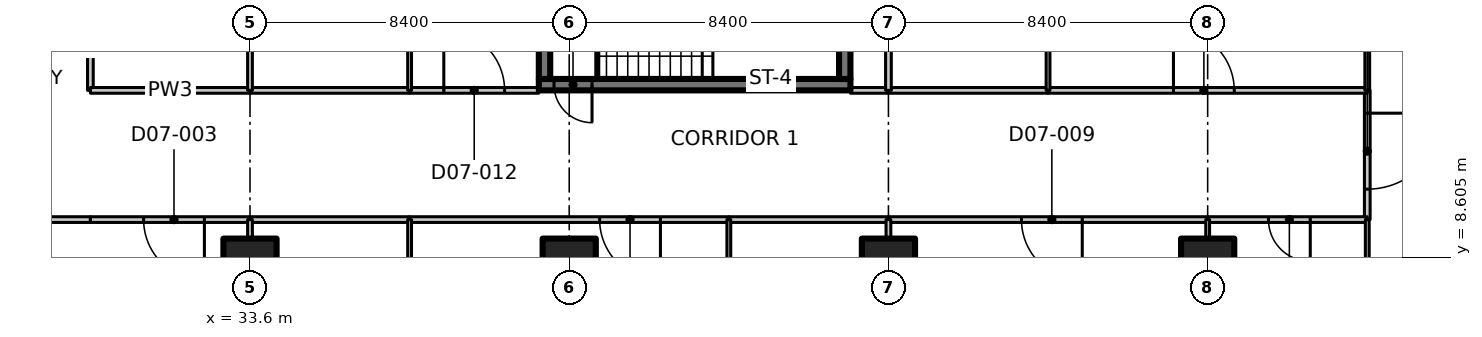
"""IFC4 building model, lengths in metres.
Left out: names, types, materials, properties, quantities, classifications, styles, units other than length and angle.
Written with IfcOpenShell. Run it as: python <this file> out.ifc"""

import sys

from ifc_helpers import new_model, si_unit, direction, frame, frame_2d, origin, origin_2d, place, context, subcontext, project, spatial, polyline, rectangle, outline, extrude, element, fill, save


model = new_model("IFC4")
c1 = context("Model", 3, precision=1e-05, world=origin(), true_north=direction((0.0, 1.0)))
c2 = subcontext(c1, "Body", "Model", "MODEL_VIEW")
j1 = project(units=[si_unit("LENGTHUNIT", "METRE"), si_unit("PLANEANGLEUNIT", "RADIAN")], contexts=[c1])
p1 = place(None, origin())
s1 = spatial("IfcSite", under=j1, at=p1, CompositionType="ELEMENT")
p2 = place(p1, origin())
s2 = spatial("IfcBuilding", under=s1, at=p2, CompositionType="ELEMENT")
p3 = place(p2, frame((0.0, 0.0, 36.5)))
s3 = spatial("IfcBuildingStorey", under=s2, at=p3, CompositionType="ELEMENT", Elevation=36.5)
for number, where, z_axis, x_axis in (
    (1, (33.6, 8.4, 0.0), (0.0, 0.0, 1.0), (1.0, 0.0, 0.0)),
    (2, (42.0, 8.4, 0.0), (0.0, 0.0, 1.0), (1.0, 0.0, 0.0)),
    (3, (50.4, 8.4, 0.0), (0.0, 0.0, 1.0), (1.0, 0.0, 0.0)),
    (4, (58.8, 8.4, 0.0), (0.0, 0.0, 1.0), (1.0, 0.0, 0.0)),
):
    element("IfcColumn", number, at=place(p3, frame(where, z_axis=z_axis, x_axis=x_axis)), inside=s3, PredefinedType="COLUMN", context=c2, shape_type="SweptSolid", body=[
        extrude(rectangle(XDim=1.4, YDim=1.4, at=origin_2d()), origin(), (0.0, 0.0, 1.0), 3.35),
    ])
p4 = place(p3, frame((49.4, 13.15, 0.0), z_axis=(0.0, 0.0, 1.0), x_axis=(-1.0, 0.0, 0.0)))
e5 = element("IfcWall", 5, at=p4, inside=s3, PredefinedType="SHEAR", context=c2, shape_type="SweptSolid", body=[
    extrude(rectangle(XDim=8.2, YDim=0.3, at=frame_2d((4.1, 0.0))), origin(), (0.0, 0.0, 1.0), 3.35),
])
p5 = place(p4, frame((6.8, 0.0, 0.0)))
e6 = element("IfcOpeningElement", 6, at=p5, cuts=e5, PredefinedType="OPENING", context=c2, shape_type="SweptSolid", body=[
    extrude(rectangle(XDim=1.0, YDim=2.1, at=frame_2d((0.5, 1.05))), frame((0.0, 0.16, 0.0), z_axis=(0.0, -1.0, 0.0), x_axis=(1.0, 0.0, 0.0)), (0.0, 0.0, 1.0), 0.32),
])
for number, where, z_axis, x_axis in (
    (7, (41.35, 13.3, 0.0), (0.0, 0.0, 1.0), (0.0, 1.0, 0.0)),
    (8, (49.25, 13.3, 0.0), (0.0, 0.0, 1.0), (0.0, 1.0, 0.0)),
):
    element("IfcWall", number, at=place(p3, frame(where, z_axis=z_axis, x_axis=x_axis)), inside=s3, PredefinedType="SHEAR", context=c2, shape_type="SweptSolid", body=[
        extrude(rectangle(XDim=2.55, YDim=0.3, at=frame_2d((1.275, 0.0))), origin(), (0.0, 0.0, 1.0), 3.35),
    ])
p6 = place(p3, frame((29.4, 9.6, 0.0), z_axis=(0.0, 0.0, 1.0), x_axis=(-1.0, 0.0, 0.0)))
e9 = element("IfcWall", 9, at=p6, inside=s3, PredefinedType="PARTITIONING", context=c2, shape_type="SweptSolid", body=[
    extrude(rectangle(XDim=4.2, YDim=0.15, at=frame_2d((2.1, 0.0))), origin(), (0.0, 0.0, 1.0), 3.33),
])
p7 = place(p3, frame((29.4, 21.2, 0.0), z_axis=(0.0, 0.0, 1.0), x_axis=(0.0, -1.0, 0.0)))
e10 = element("IfcWall", 10, at=p7, inside=s3, PredefinedType="PARTITIONING", context=c2, shape_type="SweptSolid", body=[
    extrude(rectangle(XDim=8.2, YDim=0.15, at=frame_2d((4.1, 0.0))), origin(), (0.0, 0.0, 1.0), 3.33),
])
p8 = place(p7, frame((3.3, 0.0, 0.0)))
e11 = element("IfcOpeningElement", 11, at=p8, cuts=e10, PredefinedType="OPENING", context=c2, shape_type="SweptSolid", body=[
    extrude(rectangle(XDim=1.6, YDim=2.1, at=frame_2d((0.8, 1.05))), frame((0.0, 0.085, 0.0), z_axis=(0.0, -1.0, 0.0), x_axis=(1.0, 0.0, 0.0)), (0.0, 0.0, 1.0), 0.17),
])
p9 = place(p3, frame((63.0, 13.0, 0.0), z_axis=(0.0, 0.0, 1.0), x_axis=(0.0, -1.0, 0.0)))
e12 = element("IfcWall", 12, at=p9, inside=s3, PredefinedType="PARTITIONING", context=c2, shape_type="SweptSolid", body=[
    extrude(rectangle(XDim=3.4, YDim=0.15, at=frame_2d((1.7, 0.0))), origin(), (0.0, 0.0, 1.0), 3.33),
])
p10 = place(p9, frame((0.6, 0.0, 0.0)))
e13 = element("IfcOpeningElement", 13, at=p10, cuts=e12, PredefinedType="OPENING", context=c2, shape_type="SweptSolid", body=[
    extrude(rectangle(XDim=2.0, YDim=2.4, at=frame_2d((1.0, 1.2))), frame((0.0, 0.085, 0.0), z_axis=(0.0, -1.0, 0.0), x_axis=(1.0, 0.0, 0.0)), (0.0, 0.0, 1.0), 0.17),
])
p11 = place(p3, frame((33.6, 9.6, 0.0), z_axis=(0.0, 0.0, 1.0), x_axis=(-1.0, 0.0, 0.0)))
e14 = element("IfcWall", 14, at=p11, inside=s3, PredefinedType="PARTITIONING", context=c2, shape_type="SweptSolid", body=[
    extrude(rectangle(XDim=4.2, YDim=0.15, at=frame_2d((2.1, 0.0))), origin(), (0.0, 0.0, 1.0), 3.33),
])
p12 = place(p11, frame((1.2, 0.0, 0.0)))
e15 = element("IfcOpeningElement", 15, at=p12, cuts=e14, PredefinedType="OPENING", context=c2, shape_type="SweptSolid", body=[
    extrude(rectangle(XDim=1.6, YDim=2.1, at=frame_2d((0.8, 1.05))), frame((0.0, 0.085, 0.0), z_axis=(0.0, -1.0, 0.0), x_axis=(1.0, 0.0, 0.0)), (0.0, 0.0, 1.0), 0.17),
])
p13 = place(p3, frame((46.2, 9.6, 0.0), z_axis=(0.0, 0.0, 1.0), x_axis=(-1.0, 0.0, 0.0)))
e16 = element("IfcWall", 16, at=p13, inside=s3, PredefinedType="PARTITIONING", context=c2, shape_type="SweptSolid", body=[
    extrude(rectangle(XDim=8.4, YDim=0.15, at=frame_2d((4.2, 0.0))), origin(), (0.0, 0.0, 1.0), 3.33),
])
p14 = place(p13, frame((1.8, 0.0, 0.0)))
e17 = element("IfcOpeningElement", 17, at=p14, cuts=e16, PredefinedType="OPENING", context=c2, shape_type="SweptSolid", body=[
    extrude(rectangle(XDim=1.6, YDim=2.1, at=frame_2d((0.8, 1.05))), frame((0.0, 0.085, 0.0), z_axis=(0.0, -1.0, 0.0), x_axis=(1.0, 0.0, 0.0)), (0.0, 0.0, 1.0), 0.17),
])
for number, where, z_axis, x_axis in (
    (18, (50.4, 9.6, 0.0), (0.0, 0.0, 1.0), (-1.0, 0.0, 0.0)),
    (19, (37.8, 9.6, 0.0), (0.0, 0.0, 1.0), (-1.0, 0.0, 0.0)),
):
    element("IfcWall", number, at=place(p3, frame(where, z_axis=z_axis, x_axis=x_axis)), inside=s3, PredefinedType="PARTITIONING", context=c2, shape_type="SweptSolid", body=[
        extrude(rectangle(XDim=4.2, YDim=0.15, at=frame_2d((2.1, 0.0))), origin(), (0.0, 0.0, 1.0), 3.33),
    ])
p15 = place(p3, frame((58.8, 9.6, 0.0), z_axis=(0.0, 0.0, 1.0), x_axis=(-1.0, 0.0, 0.0)))
e20 = element("IfcWall", 20, at=p15, inside=s3, PredefinedType="PARTITIONING", context=c2, shape_type="SweptSolid", body=[
    extrude(rectangle(XDim=8.4, YDim=0.15, at=frame_2d((4.2, 0.0))), origin(), (0.0, 0.0, 1.0), 3.33),
])
p16 = place(p15, frame((3.3, 0.0, 0.0)))
e21 = element("IfcOpeningElement", 21, at=p16, cuts=e20, PredefinedType="OPENING", context=c2, shape_type="SweptSolid", body=[
    extrude(rectangle(XDim=1.6, YDim=2.1, at=frame_2d((0.8, 1.05))), frame((0.0, 0.085, 0.0), z_axis=(0.0, -1.0, 0.0), x_axis=(1.0, 0.0, 0.0)), (0.0, 0.0, 1.0), 0.17),
])
p17 = place(p3, frame((63.0, 9.6, 0.0), z_axis=(0.0, 0.0, 1.0), x_axis=(-1.0, 0.0, 0.0)))
e22 = element("IfcWall", 22, at=p17, inside=s3, PredefinedType="PARTITIONING", context=c2, shape_type="SweptSolid", body=[
    extrude(rectangle(XDim=4.2, YDim=0.15, at=frame_2d((2.1, 0.0))), origin(), (0.0, 0.0, 1.0), 3.33),
])
p18 = place(p17, frame((1.5, 0.0, 0.0)))
e23 = element("IfcOpeningElement", 23, at=p18, cuts=e22, PredefinedType="OPENING", context=c2, shape_type="SweptSolid", body=[
    extrude(rectangle(XDim=1.1, YDim=2.1, at=frame_2d((0.55, 1.05))), frame((0.0, 0.085, 0.0), z_axis=(0.0, -1.0, 0.0), x_axis=(1.0, 0.0, 0.0)), (0.0, 0.0, 1.0), 0.17),
])
p19 = place(p3, frame((29.4, 13.0, 0.0), z_axis=(0.0, 0.0, 1.0), x_axis=(1.0, 0.0, 0.0)))
e24 = element("IfcWall", 24, at=p19, inside=s3, PredefinedType="PARTITIONING", context=c2, shape_type="SweptSolid", body=[
    extrude(rectangle(XDim=4.2, YDim=0.15, at=frame_2d((2.1, 0.0))), origin(), (0.0, 0.0, 1.0), 3.33),
])
p20 = place(p3, frame((37.8, 13.0, 0.0), z_axis=(0.0, 0.0, 1.0), x_axis=(1.0, 0.0, 0.0)))
e25 = element("IfcWall", 25, at=p20, inside=s3, PredefinedType="PARTITIONING", context=c2, shape_type="SweptSolid", body=[
    extrude(rectangle(XDim=3.4, YDim=0.15, at=frame_2d((1.7, 0.0))), origin(), (0.0, 0.0, 1.0), 3.33),
])
p21 = place(p20, frame((0.9, 0.0, 0.0)))
e26 = element("IfcOpeningElement", 26, at=p21, cuts=e25, PredefinedType="OPENING", context=c2, shape_type="SweptSolid", body=[
    extrude(rectangle(XDim=1.6, YDim=2.1, at=frame_2d((0.8, 1.05))), frame((0.0, 0.085, 0.0), z_axis=(0.0, -1.0, 0.0), x_axis=(1.0, 0.0, 0.0)), (0.0, 0.0, 1.0), 0.17),
])
p22 = place(p3, frame((49.4, 13.0, 0.0), z_axis=(0.0, 0.0, 1.0), x_axis=(1.0, 0.0, 0.0)))
e27 = element("IfcWall", 27, at=p22, inside=s3, PredefinedType="PARTITIONING", context=c2, shape_type="SweptSolid", body=[
    extrude(rectangle(XDim=1.0, YDim=0.15, at=frame_2d((0.5, 0.0))), origin(), (0.0, 0.0, 1.0), 3.33),
])
p23 = place(p3, frame((33.6, 13.0, 0.0), z_axis=(0.0, 0.0, 1.0), x_axis=(1.0, 0.0, 0.0)))
e28 = element("IfcWall", 28, at=p23, inside=s3, PredefinedType="PARTITIONING", context=c2, shape_type="SweptSolid", body=[
    extrude(rectangle(XDim=4.2, YDim=0.15, at=frame_2d((2.1, 0.0))), origin(), (0.0, 0.0, 1.0), 3.33),
])
p24 = place(p3, frame((54.6, 13.0, 0.0), z_axis=(0.0, 0.0, 1.0), x_axis=(1.0, 0.0, 0.0)))
e29 = element("IfcWall", 29, at=p24, inside=s3, PredefinedType="PARTITIONING", context=c2, shape_type="SweptSolid", body=[
    extrude(rectangle(XDim=8.4, YDim=0.15, at=frame_2d((4.2, 0.0))), origin(), (0.0, 0.0, 1.0), 3.33),
])
p25 = place(p24, frame((3.3, 0.0, 0.0)))
e30 = element("IfcOpeningElement", 30, at=p25, cuts=e29, PredefinedType="OPENING", context=c2, shape_type="SweptSolid", body=[
    extrude(rectangle(XDim=1.6, YDim=2.1, at=frame_2d((0.8, 1.05))), frame((0.0, 0.085, 0.0), z_axis=(0.0, -1.0, 0.0), x_axis=(1.0, 0.0, 0.0)), (0.0, 0.0, 1.0), 0.17),
])
p26 = place(p3, frame((50.4, 13.0, 0.0), z_axis=(0.0, 0.0, 1.0), x_axis=(1.0, 0.0, 0.0)))
e31 = element("IfcWall", 31, at=p26, inside=s3, PredefinedType="PARTITIONING", context=c2, shape_type="SweptSolid", body=[
    extrude(rectangle(XDim=4.2, YDim=0.15, at=frame_2d((2.1, 0.0))), origin(), (0.0, 0.0, 1.0), 3.33),
])
p27 = place(p3, frame((63.0, -0.2, 0.0), z_axis=(0.0, 0.0, 1.0), x_axis=(0.0, 1.0, 0.0)))
e32 = element("IfcWall", 32, at=p27, inside=s3, PredefinedType="PARTITIONING", context=c2, shape_type="SweptSolid", body=[
    extrude(outline(polyline([(0.0, 0.0), (9.8, 0.0), (9.8, 3.33), (5.066, 3.33), (5.064, 2.98), (3.736, 2.98), (3.734, 3.33), (0.0, 3.33), (0.0, 0.0)])), frame((0.0, 0.05, 0.0), z_axis=(0.0, -1.0, 0.0), x_axis=(1.0, 0.0, 0.0)), (0.0, 0.0, 1.0), 0.1),
])
p28 = place(p3, frame((63.0, 13.0, 0.0), z_axis=(0.0, 0.0, 1.0), x_axis=(0.0, 1.0, 0.0)))
e33 = element("IfcWall", 33, at=p28, inside=s3, PredefinedType="PARTITIONING", context=c2, shape_type="SweptSolid", body=[
    extrude(outline(polyline([(0.0, 0.0), (12.4, 0.0), (12.4, 3.33), (8.678, 3.33), (8.676, 2.98), (7.324, 2.98), (7.322, 3.33), (0.0, 3.33), (0.0, 0.0)])), frame((0.0, 0.062, 0.0), z_axis=(0.0, -1.0, 0.0), x_axis=(1.0, 0.0, 0.0)), (0.0, 0.0, 1.0), 0.125),
])
p29 = place(p3, frame((33.6, 9.6, 0.0), z_axis=(0.0, 0.0, 1.0), x_axis=(0.0, -1.0, 0.0)))
e34 = element("IfcWall", 34, at=p29, inside=s3, PredefinedType="PARTITIONING", context=c2, shape_type="SweptSolid", body=[
    extrude(rectangle(XDim=0.48, YDim=0.125, at=frame_2d((0.24, 0.0))), origin(), (0.0, 0.0, 1.0), 3.33),
])
p30 = place(p3, frame((46.2, 9.6, 0.0), z_axis=(0.0, 0.0, 1.0), x_axis=(0.0, -1.0, 0.0)))
e35 = element("IfcWall", 35, at=p30, inside=s3, PredefinedType="PARTITIONING", context=c2, shape_type="SweptSolid", body=[
    extrude(rectangle(XDim=7.8, YDim=0.1, at=frame_2d((3.9, 0.0))), origin(), (0.0, 0.0, 1.0), 3.33),
])
p31 = place(p30, frame((3.3, 0.0, 0.0)))
e36 = element("IfcOpeningElement", 36, at=p31, cuts=e35, PredefinedType="OPENING", context=c2, shape_type="SweptSolid", body=[
    extrude(rectangle(XDim=1.0, YDim=2.1, at=frame_2d((0.5, 1.05))), frame((0.0, 0.06, 0.0), z_axis=(0.0, -1.0, 0.0), x_axis=(1.0, 0.0, 0.0)), (0.0, 0.0, 1.0), 0.12),
])
p32 = place(p3, frame((37.8, 1.8, 0.0), z_axis=(0.0, 0.0, 1.0), x_axis=(0.0, 1.0, 0.0)))
e37 = element("IfcWall", 37, at=p32, inside=s3, PredefinedType="PARTITIONING", context=c2, shape_type="SweptSolid", body=[
    extrude(rectangle(XDim=7.8, YDim=0.1, at=frame_2d((3.9, 0.0))), origin(), (0.0, 0.0, 1.0), 3.33),
])
p33 = place(p32, frame((3.3, 0.0, 0.0)))
e38 = element("IfcOpeningElement", 38, at=p33, cuts=e37, PredefinedType="OPENING", context=c2, shape_type="SweptSolid", body=[
    extrude(rectangle(XDim=1.0, YDim=2.1, at=frame_2d((0.5, 1.05))), frame((0.0, 0.06, 0.0), z_axis=(0.0, -1.0, 0.0), x_axis=(1.0, 0.0, 0.0)), (0.0, 0.0, 1.0), 0.12),
])
p34 = place(p3, frame((50.4, 9.6, 0.0), z_axis=(0.0, 0.0, 1.0), x_axis=(0.0, -1.0, 0.0)))
e39 = element("IfcWall", 39, at=p34, inside=s3, PredefinedType="PARTITIONING", context=c2, shape_type="SweptSolid", body=[
    extrude(rectangle(XDim=0.48, YDim=0.125, at=frame_2d((0.24, 0.0))), origin(), (0.0, 0.0, 1.0), 3.33),
])
p35 = place(p3, frame((58.8, 9.6, 0.0), z_axis=(0.0, 0.0, 1.0), x_axis=(0.0, -1.0, 0.0)))
e40 = element("IfcWall", 40, at=p35, inside=s3, PredefinedType="PARTITIONING", context=c2, shape_type="SweptSolid", body=[
    extrude(rectangle(XDim=0.48, YDim=0.1, at=frame_2d((0.24, 0.0))), origin(), (0.0, 0.0, 1.0), 3.33),
])
p36 = place(p3, frame((33.6, 16.08, 0.0), z_axis=(0.0, 0.0, 1.0), x_axis=(0.0, -1.0, 0.0)))
e41 = element("IfcWall", 41, at=p36, inside=s3, PredefinedType="PARTITIONING", context=c2, shape_type="SweptSolid", body=[
    extrude(rectangle(XDim=3.08, YDim=0.125, at=frame_2d((1.54, 0.0))), origin(), (0.0, 0.0, 1.0), 3.33),
])
p37 = place(p3, frame((37.8, 13.0, 0.0), z_axis=(0.0, 0.0, 1.0), x_axis=(0.0, 1.0, 0.0)))
e42 = element("IfcWall", 42, at=p37, inside=s3, PredefinedType="PARTITIONING", context=c2, shape_type="SweptSolid", body=[
    extrude(rectangle(XDim=6.6, YDim=0.1, at=frame_2d((3.3, 0.0))), origin(), (0.0, 0.0, 1.0), 3.33),
])
p38 = place(p37, frame((2.7, 0.0, 0.0)))
e43 = element("IfcOpeningElement", 43, at=p38, cuts=e42, PredefinedType="OPENING", context=c2, shape_type="SweptSolid", body=[
    extrude(rectangle(XDim=1.0, YDim=2.1, at=frame_2d((0.5, 1.05))), frame((0.0, 0.06, 0.0), z_axis=(0.0, -1.0, 0.0), x_axis=(1.0, 0.0, 0.0)), (0.0, 0.0, 1.0), 0.12),
])
p39 = place(p3, frame((50.4, 16.08, 0.0), z_axis=(0.0, 0.0, 1.0), x_axis=(0.0, -1.0, 0.0)))
e44 = element("IfcWall", 44, at=p39, inside=s3, PredefinedType="PARTITIONING", context=c2, shape_type="SweptSolid", body=[
    extrude(rectangle(XDim=3.08, YDim=0.15, at=frame_2d((1.54, 0.0))), origin(), (0.0, 0.0, 1.0), 3.33),
])
p40 = place(p3, frame((54.6, 13.0, 0.0), z_axis=(0.0, 0.0, 1.0), x_axis=(0.0, 1.0, 0.0)))
e45 = element("IfcWall", 45, at=p40, inside=s3, PredefinedType="PARTITIONING", context=c2, shape_type="SweptSolid", body=[
    extrude(rectangle(XDim=9.0, YDim=0.1, at=frame_2d((4.5, 0.0))), origin(), (0.0, 0.0, 1.0), 3.33),
])
p41 = place(p40, frame((3.9, 0.0, 0.0)))
e46 = element("IfcOpeningElement", 46, at=p41, cuts=e45, PredefinedType="OPENING", context=c2, shape_type="SweptSolid", body=[
    extrude(rectangle(XDim=1.0, YDim=2.1, at=frame_2d((0.5, 1.05))), frame((0.0, 0.06, 0.0), z_axis=(0.0, -1.0, 0.0), x_axis=(1.0, 0.0, 0.0)), (0.0, 0.0, 1.0), 0.12),
])
p42 = place(p5, origin())
e47 = element("IfcDoor", 47, at=p42, inside=s3, OperationType="SINGLE_SWING_LEFT", PredefinedType="DOOR", context=c2, shape_type="SweptSolid", body=[
    extrude(rectangle(XDim=1.0, YDim=2.1, at=frame_2d((0.5, 1.05))), frame((0.0, 0.025, 0.0), z_axis=(0.0, -1.0, 0.0), x_axis=(1.0, 0.0, 0.0)), (0.0, 0.0, 1.0), 0.05),
])
fill(e6, e47)
p43 = place(p10, origin())
e48 = element("IfcDoor", 48, at=p43, inside=s3, OperationType="DOUBLE_DOOR_SINGLE_SWING", PredefinedType="DOOR", context=c2, shape_type="SweptSolid", body=[
    extrude(rectangle(XDim=2.0, YDim=2.4, at=frame_2d((1.0, 1.2))), frame((0.0, 0.025, 0.0), z_axis=(0.0, -1.0, 0.0), x_axis=(1.0, 0.0, 0.0)), (0.0, 0.0, 1.0), 0.05),
])
fill(e13, e48)
p44 = place(p12, origin())
e49 = element("IfcDoor", 49, at=p44, inside=s3, OperationType="DOUBLE_DOOR_SINGLE_SWING", PredefinedType="DOOR", context=c2, shape_type="SweptSolid", body=[
    extrude(rectangle(XDim=1.6, YDim=2.1, at=frame_2d((0.8, 1.05))), frame((0.0, 0.025, 0.0), z_axis=(0.0, -1.0, 0.0), x_axis=(1.0, 0.0, 0.0)), (0.0, 0.0, 1.0), 0.05),
])
fill(e15, e49)
p45 = place(p14, origin())
e50 = element("IfcDoor", 50, at=p45, inside=s3, OperationType="DOUBLE_DOOR_SINGLE_SWING", PredefinedType="DOOR", context=c2, shape_type="SweptSolid", body=[
    extrude(rectangle(XDim=1.6, YDim=2.1, at=frame_2d((0.8, 1.05))), frame((0.0, 0.025, 0.0), z_axis=(0.0, -1.0, 0.0), x_axis=(1.0, 0.0, 0.0)), (0.0, 0.0, 1.0), 0.05),
])
fill(e17, e50)
p46 = place(p16, origin())
e51 = element("IfcDoor", 51, at=p46, inside=s3, OperationType="DOUBLE_DOOR_SINGLE_SWING", PredefinedType="DOOR", context=c2, shape_type="SweptSolid", body=[
    extrude(rectangle(XDim=1.6, YDim=2.1, at=frame_2d((0.8, 1.05))), frame((0.0, 0.025, 0.0), z_axis=(0.0, -1.0, 0.0), x_axis=(1.0, 0.0, 0.0)), (0.0, 0.0, 1.0), 0.05),
])
fill(e21, e51)
p47 = place(p18, origin())
e52 = element("IfcDoor", 52, at=p47, inside=s3, OperationType="SINGLE_SWING_LEFT", PredefinedType="DOOR", context=c2, shape_type="SweptSolid", body=[
    extrude(rectangle(XDim=1.1, YDim=2.1, at=frame_2d((0.55, 1.05))), frame((0.0, 0.025, 0.0), z_axis=(0.0, -1.0, 0.0), x_axis=(1.0, 0.0, 0.0)), (0.0, 0.0, 1.0), 0.05),
])
fill(e23, e52)
p48 = place(p21, origin())
e53 = element("IfcDoor", 53, at=p48, inside=s3, OperationType="DOUBLE_DOOR_SINGLE_SWING", PredefinedType="DOOR", context=c2, shape_type="SweptSolid", body=[
    extrude(rectangle(XDim=1.6, YDim=2.1, at=frame_2d((0.8, 1.05))), frame((0.0, 0.025, 0.0), z_axis=(0.0, -1.0, 0.0), x_axis=(1.0, 0.0, 0.0)), (0.0, 0.0, 1.0), 0.05),
])
fill(e26, e53)
p49 = place(p25, origin())
e54 = element("IfcDoor", 54, at=p49, inside=s3, OperationType="DOUBLE_DOOR_SINGLE_SWING", PredefinedType="DOOR", context=c2, shape_type="SweptSolid", body=[
    extrude(rectangle(XDim=1.6, YDim=2.1, at=frame_2d((0.8, 1.05))), frame((0.0, 0.025, 0.0), z_axis=(0.0, -1.0, 0.0), x_axis=(1.0, 0.0, 0.0)), (0.0, 0.0, 1.0), 0.05),
])
fill(e30, e54)
save(model, sys.argv[1])
